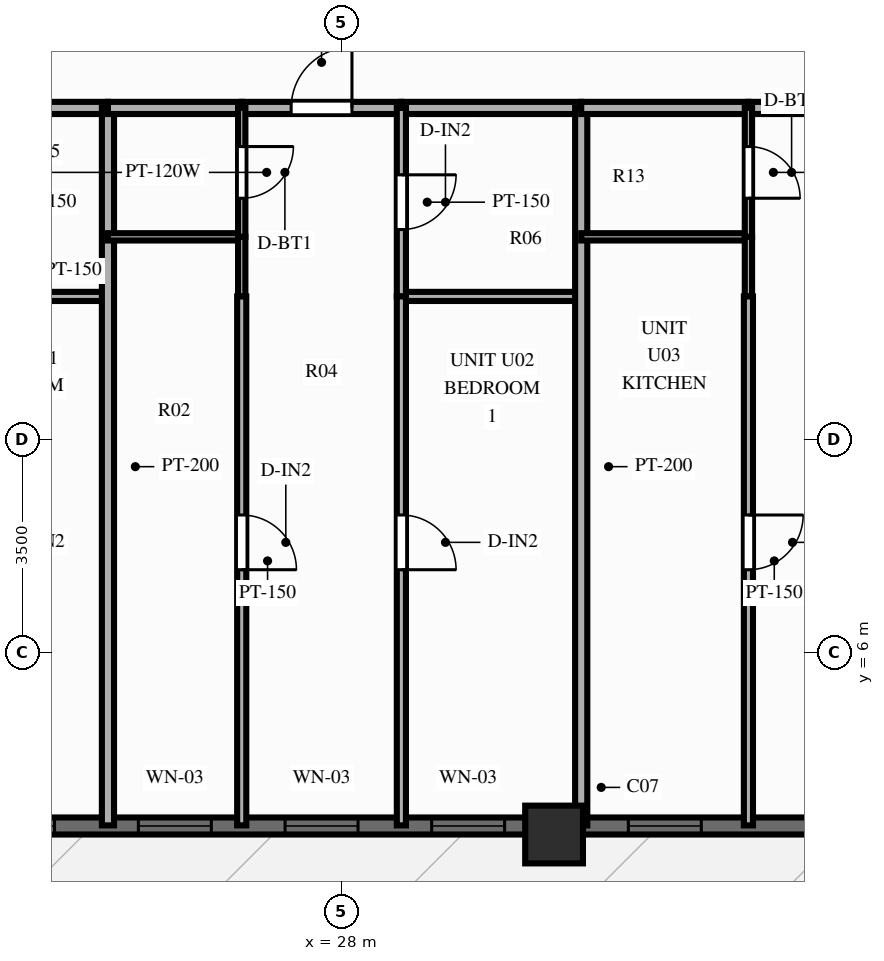
"""IFC4 building model, lengths in metres.
Left out: names, types, materials, properties, quantities, classifications, styles, units other than length and angle.
Written with IfcOpenShell. Run it as: python <this file> out.ifc"""

import sys

from ifc_helpers import new_model, si_unit, direction, frame, frame_2d, origin, origin_2d, place, context, subcontext, project, spatial, rectangle, extrude, source, transform, mapped, element, fill, save


model = new_model("IFC4")
c1 = context("Model", 3, precision=1e-05, world=origin(), true_north=direction((0.0, 1.0)))
c2 = subcontext(c1, "Body", "Model", "MODEL_VIEW")
j1 = project(units=[si_unit("LENGTHUNIT", "METRE"), si_unit("PLANEANGLEUNIT", "RADIAN")], contexts=[c1])
p1 = place(None, origin())
s1 = spatial("IfcSite", under=j1, at=p1, CompositionType="ELEMENT")
p2 = place(p1, origin())
s2 = spatial("IfcBuilding", under=s1, at=p2, CompositionType="ELEMENT")
p3 = place(p2, frame((0.0, 0.0, 80.85)))
s3 = spatial("IfcBuildingStorey", under=s2, at=p3, CompositionType="ELEMENT", Elevation=80.85)
m1 = source(origin(), c2, "Body", "SweptSolid", [
    extrude(rectangle(XDim=0.95, YDim=0.95, at=origin_2d()), origin(), (0.0, 0.0, 1.0), 3.0),
])
p4 = place(p3, frame((31.5, 3.0, 0.0), z_axis=(0.0, 0.0, 1.0), x_axis=(1.0, 0.0, 0.0)))
e1 = element("IfcColumn", 1, at=p4, inside=s3, PredefinedType="COLUMN", context=c2, shape_type="MappedRepresentation", body=[
    mapped(m1, transform((0.0, 0.0, 0.0), scale=1.0)),
])
p5 = place(p3, frame((16.2, 3.14, 0.0), z_axis=(0.0, 0.0, 1.0), x_axis=(1.0, 0.0, 0.0)))
e2 = element("IfcWall", 2, at=p5, inside=s3, PredefinedType="SOLIDWALL", context=c2, shape_type="SweptSolid", body=[
    extrude(rectangle(XDim=43.6, YDim=0.28, at=frame_2d((21.8, 0.0))), origin(), (0.0, 0.0, 1.0), 2.28),
])
p6 = place(p5, frame((0.748, 0.0, 0.25)))
e3 = element("IfcOpeningElement", 3, at=p6, cuts=e2, PredefinedType="OPENING", context=c2, shape_type="SweptSolid", body=[
    extrude(rectangle(XDim=1.2, YDim=1.5, at=frame_2d((0.6, 0.75))), frame((0.0, 0.152, 0.0), z_axis=(0.0, -1.0, 0.0), x_axis=(1.0, 0.0, 0.0)), (0.0, 0.0, 1.0), 0.304),
])
p7 = place(p5, frame((3.093, 0.0, 0.25)))
e4 = element("IfcOpeningElement", 4, at=p7, cuts=e2, PredefinedType="OPENING", context=c2, shape_type="SweptSolid", body=[
    extrude(rectangle(XDim=1.2, YDim=1.5, at=frame_2d((0.6, 0.75))), frame((0.0, 0.152, 0.0), z_axis=(0.0, -1.0, 0.0), x_axis=(1.0, 0.0, 0.0)), (0.0, 0.0, 1.0), 0.304),
])
p8 = place(p5, frame((5.885, 0.0, 0.25)))
e5 = element("IfcOpeningElement", 5, at=p8, cuts=e2, PredefinedType="OPENING", context=c2, shape_type="SweptSolid", body=[
    extrude(rectangle(XDim=1.2, YDim=1.5, at=frame_2d((0.6, 0.75))), frame((0.0, 0.152, 0.0), z_axis=(0.0, -1.0, 0.0), x_axis=(1.0, 0.0, 0.0)), (0.0, 0.0, 1.0), 0.304),
])
p9 = place(p5, frame((8.463, 0.0, 0.25)))
e6 = element("IfcOpeningElement", 6, at=p9, cuts=e2, PredefinedType="OPENING", context=c2, shape_type="SweptSolid", body=[
    extrude(rectangle(XDim=1.2, YDim=1.5, at=frame_2d((0.6, 0.75))), frame((0.0, 0.152, 0.0), z_axis=(0.0, -1.0, 0.0), x_axis=(1.0, 0.0, 0.0)), (0.0, 0.0, 1.0), 0.304),
])
p10 = place(p5, frame((10.876, 0.0, 0.25)))
e7 = element("IfcOpeningElement", 7, at=p10, cuts=e2, PredefinedType="OPENING", context=c2, shape_type="SweptSolid", body=[
    extrude(rectangle(XDim=1.2, YDim=1.5, at=frame_2d((0.6, 0.75))), frame((0.0, 0.152, 0.0), z_axis=(0.0, -1.0, 0.0), x_axis=(1.0, 0.0, 0.0)), (0.0, 0.0, 1.0), 0.304),
])
p11 = place(p5, frame((13.287, 0.0, 0.25)))
e8 = element("IfcOpeningElement", 8, at=p11, cuts=e2, PredefinedType="OPENING", context=c2, shape_type="SweptSolid", body=[
    extrude(rectangle(XDim=1.2, YDim=1.5, at=frame_2d((0.6, 0.75))), frame((0.0, 0.152, 0.0), z_axis=(0.0, -1.0, 0.0), x_axis=(1.0, 0.0, 0.0)), (0.0, 0.0, 1.0), 0.304),
])
p12 = place(p5, frame((16.521, 0.0, 0.25)))
e9 = element("IfcOpeningElement", 9, at=p12, cuts=e2, PredefinedType="OPENING", context=c2, shape_type="SweptSolid", body=[
    extrude(rectangle(XDim=1.2, YDim=1.5, at=frame_2d((0.6, 0.75))), frame((0.0, 0.152, 0.0), z_axis=(0.0, -1.0, 0.0), x_axis=(1.0, 0.0, 0.0)), (0.0, 0.0, 1.0), 0.304),
])
p13 = place(p5, frame((22.938, 0.0, 0.0), z_axis=(0.0, 0.0, 1.0), x_axis=(-1.0, 0.0, 0.0)))
e10 = element("IfcOpeningElement", 10, at=p13, cuts=e2, PredefinedType="OPENING", context=c2, shape_type="SweptSolid", body=[
    extrude(rectangle(XDim=1.1, YDim=2.15, at=frame_2d((0.55, 1.075))), frame((0.0, 0.152, 0.0), z_axis=(0.0, -1.0, 0.0), x_axis=(1.0, 0.0, 0.0)), (0.0, 0.0, 1.0), 0.304),
])
p14 = place(p5, frame((26.657, 0.0, 0.25)))
e11 = element("IfcOpeningElement", 11, at=p14, cuts=e2, PredefinedType="OPENING", context=c2, shape_type="SweptSolid", body=[
    extrude(rectangle(XDim=0.95, YDim=1.5, at=frame_2d((0.475, 0.75))), frame((0.0, 0.152, 0.0), z_axis=(0.0, -1.0, 0.0), x_axis=(1.0, 0.0, 0.0)), (0.0, 0.0, 1.0), 0.304),
])
p15 = place(p5, frame((28.965, 0.0, 0.25)))
e12 = element("IfcOpeningElement", 12, at=p15, cuts=e2, PredefinedType="OPENING", context=c2, shape_type="SweptSolid", body=[
    extrude(rectangle(XDim=0.7, YDim=1.5, at=frame_2d((0.35, 0.75))), frame((0.0, 0.152, 0.0), z_axis=(0.0, -1.0, 0.0), x_axis=(1.0, 0.0, 0.0)), (0.0, 0.0, 1.0), 0.304),
])
p16 = place(p5, frame((31.158, 0.0, 0.25)))
e13 = element("IfcOpeningElement", 13, at=p16, cuts=e2, PredefinedType="OPENING", context=c2, shape_type="SweptSolid", body=[
    extrude(rectangle(XDim=1.2, YDim=1.5, at=frame_2d((0.6, 0.75))), frame((0.0, 0.152, 0.0), z_axis=(0.0, -1.0, 0.0), x_axis=(1.0, 0.0, 0.0)), (0.0, 0.0, 1.0), 0.304),
])
p17 = place(p5, frame((35.992, 0.0, 0.25)))
e14 = element("IfcOpeningElement", 14, at=p17, cuts=e2, PredefinedType="OPENING", context=c2, shape_type="SweptSolid", body=[
    extrude(rectangle(XDim=1.2, YDim=1.5, at=frame_2d((0.6, 0.75))), frame((0.0, 0.152, 0.0), z_axis=(0.0, -1.0, 0.0), x_axis=(1.0, 0.0, 0.0)), (0.0, 0.0, 1.0), 0.304),
])
p18 = place(p5, frame((40.885, 0.0, 0.25)))
e15 = element("IfcOpeningElement", 15, at=p18, cuts=e2, PredefinedType="OPENING", context=c2, shape_type="SweptSolid", body=[
    extrude(rectangle(XDim=1.2, YDim=1.5, at=frame_2d((0.6, 0.75))), frame((0.0, 0.152, 0.0), z_axis=(0.0, -1.0, 0.0), x_axis=(1.0, 0.0, 0.0)), (0.0, 0.0, 1.0), 0.304),
])
p19 = place(p3, frame((21.206, 14.95, 0.0), z_axis=(0.0, 0.0, 1.0), x_axis=(1.0, 0.0, 0.0)))
e16 = element("IfcWall", 16, at=p19, inside=s3, PredefinedType="PARTITIONING", context=c2, shape_type="SweptSolid", body=[
    extrude(rectangle(XDim=2.958, YDim=0.2, at=frame_2d((1.479, 0.0))), origin(), (0.0, 0.0, 1.0), 2.79),
])
p20 = place(p3, frame((21.206, 11.85, 0.0), z_axis=(0.0, 0.0, 1.0), x_axis=(1.0, 0.0, 0.0)))
e17 = element("IfcWall", 17, at=p20, inside=s3, PredefinedType="PARTITIONING", context=c2, shape_type="SweptSolid", body=[
    extrude(rectangle(XDim=2.958, YDim=0.15, at=frame_2d((1.479, 0.0))), origin(), (0.0, 0.0, 1.0), 2.79),
])
p21 = place(p3, frame((24.163, 14.95, 0.0), z_axis=(0.0, 0.0, 1.0), x_axis=(0.0, -1.0, 0.0)))
e18 = element("IfcWall", 18, at=p21, inside=s3, PredefinedType="PARTITIONING", context=c2, shape_type="SweptSolid", body=[
    extrude(rectangle(XDim=11.8, YDim=0.2, at=frame_2d((5.9, 0.0))), origin(), (0.0, 0.0, 1.0), 2.79),
])
p22 = place(p3, frame((24.163, 14.95, 0.0), z_axis=(0.0, 0.0, 1.0), x_axis=(1.0, 0.0, 0.0)))
e19 = element("IfcWall", 19, at=p22, inside=s3, PredefinedType="PARTITIONING", context=c2, shape_type="SweptSolid", body=[
    extrude(rectangle(XDim=2.2, YDim=0.2, at=frame_2d((1.1, 0.0))), origin(), (0.0, 0.0, 1.0), 2.79),
])
p23 = place(p3, frame((26.363, 14.95, 0.0), z_axis=(0.0, 0.0, 1.0), x_axis=(1.0, 0.0, 0.0)))
e20 = element("IfcWall", 20, at=p23, inside=s3, PredefinedType="PARTITIONING", context=c2, shape_type="SweptSolid", body=[
    extrude(rectangle(XDim=2.625, YDim=0.2, at=frame_2d((1.313, 0.0))), origin(), (0.0, 0.0, 1.0), 2.79),
])
p24 = place(p23, frame((0.813, 0.0, 0.0)))
e21 = element("IfcOpeningElement", 21, at=p24, cuts=e20, PredefinedType="OPENING", context=c2, shape_type="SweptSolid", body=[
    extrude(rectangle(XDim=1.0, YDim=2.15, at=frame_2d((0.5, 1.075))), frame((0.0, 0.112, 0.0), z_axis=(0.0, -1.0, 0.0), x_axis=(1.0, 0.0, 0.0)), (0.0, 0.0, 1.0), 0.224),
])
p25 = place(p3, frame((28.989, 14.95, 0.0), z_axis=(0.0, 0.0, 1.0), x_axis=(1.0, 0.0, 0.0)))
e22 = element("IfcWall", 22, at=p25, inside=s3, PredefinedType="PARTITIONING", context=c2, shape_type="SweptSolid", body=[
    extrude(rectangle(XDim=2.958, YDim=0.2, at=frame_2d((1.479, 0.0))), origin(), (0.0, 0.0, 1.0), 2.79),
])
p26 = place(p3, frame((24.163, 12.83, 0.0), z_axis=(0.0, 0.0, 1.0), x_axis=(1.0, 0.0, 0.0)))
e23 = element("IfcWall", 23, at=p26, inside=s3, PredefinedType="PARTITIONING", context=c2, shape_type="SweptSolid", body=[
    extrude(rectangle(XDim=2.2, YDim=0.12, at=frame_2d((1.1, 0.0))), origin(), (0.0, 0.0, 1.0), 2.79),
])
p27 = place(p3, frame((28.989, 11.85, 0.0), z_axis=(0.0, 0.0, 1.0), x_axis=(1.0, 0.0, 0.0)))
e24 = element("IfcWall", 24, at=p27, inside=s3, PredefinedType="PARTITIONING", context=c2, shape_type="SweptSolid", body=[
    extrude(rectangle(XDim=2.958, YDim=0.15, at=frame_2d((1.479, 0.0))), origin(), (0.0, 0.0, 1.0), 2.79),
])
p28 = place(p3, frame((26.363, 14.95, 0.0), z_axis=(0.0, 0.0, 1.0), x_axis=(0.0, -1.0, 0.0)))
e25 = element("IfcWall", 25, at=p28, inside=s3, PredefinedType="PARTITIONING", context=c2, shape_type="SweptSolid", body=[
    extrude(rectangle(XDim=2.12, YDim=0.12, at=frame_2d((1.06, 0.0))), origin(), (0.0, 0.0, 1.0), 2.79),
])
p29 = place(p28, frame((0.635, 0.0, 0.0)))
e26 = element("IfcOpeningElement", 26, at=p29, cuts=e25, PredefinedType="OPENING", context=c2, shape_type="SweptSolid", body=[
    extrude(rectangle(XDim=0.85, YDim=2.05, at=frame_2d((0.425, 1.025))), frame((0.0, 0.072, 0.0), z_axis=(0.0, -1.0, 0.0), x_axis=(1.0, 0.0, 0.0)), (0.0, 0.0, 1.0), 0.144),
])
p30 = place(p3, frame((26.363, 12.83, 0.0), z_axis=(0.0, 0.0, 1.0), x_axis=(0.0, -1.0, 0.0)))
e27 = element("IfcWall", 27, at=p30, inside=s3, PredefinedType="PARTITIONING", context=c2, shape_type="SweptSolid", body=[
    extrude(rectangle(XDim=0.98, YDim=0.12, at=frame_2d((0.49, 0.0))), origin(), (0.0, 0.0, 1.0), 2.79),
])
p31 = place(p3, frame((26.363, 11.85, 0.0), z_axis=(0.0, 0.0, 1.0), x_axis=(0.0, -1.0, 0.0)))
e28 = element("IfcWall", 28, at=p31, inside=s3, PredefinedType="PARTITIONING", context=c2, shape_type="SweptSolid", body=[
    extrude(rectangle(XDim=8.7, YDim=0.15, at=frame_2d((4.35, 0.0))), origin(), (0.0, 0.0, 1.0), 2.79),
])
p32 = place(p31, frame((3.595, 0.0, 0.0)))
e29 = element("IfcOpeningElement", 29, at=p32, cuts=e28, PredefinedType="OPENING", context=c2, shape_type="SweptSolid", body=[
    extrude(rectangle(XDim=0.9, YDim=2.1, at=frame_2d((0.45, 1.05))), frame((0.0, 0.087, 0.0), z_axis=(0.0, -1.0, 0.0), x_axis=(1.0, 0.0, 0.0)), (0.0, 0.0, 1.0), 0.174),
])
p33 = place(p3, frame((28.989, 14.95, 0.0), z_axis=(0.0, 0.0, 1.0), x_axis=(0.0, -1.0, 0.0)))
e30 = element("IfcWall", 30, at=p33, inside=s3, PredefinedType="PARTITIONING", context=c2, shape_type="SweptSolid", body=[
    extrude(rectangle(XDim=3.1, YDim=0.15, at=frame_2d((1.55, 0.0))), origin(), (0.0, 0.0, 1.0), 2.79),
])
p34 = place(p33, frame((1.1, 0.0, 0.0)))
e31 = element("IfcOpeningElement", 31, at=p34, cuts=e30, PredefinedType="OPENING", context=c2, shape_type="SweptSolid", body=[
    extrude(rectangle(XDim=0.9, YDim=2.1, at=frame_2d((0.45, 1.05))), frame((0.0, 0.087, 0.0), z_axis=(0.0, -1.0, 0.0), x_axis=(1.0, 0.0, 0.0)), (0.0, 0.0, 1.0), 0.174),
])
p35 = place(p3, frame((28.989, 11.85, 0.0), z_axis=(0.0, 0.0, 1.0), x_axis=(0.0, -1.0, 0.0)))
e32 = element("IfcWall", 32, at=p35, inside=s3, PredefinedType="PARTITIONING", context=c2, shape_type="SweptSolid", body=[
    extrude(rectangle(XDim=8.7, YDim=0.15, at=frame_2d((4.35, 0.0))), origin(), (0.0, 0.0, 1.0), 2.79),
])
p36 = place(p35, frame((3.595, 0.0, 0.0)))
e33 = element("IfcOpeningElement", 33, at=p36, cuts=e32, PredefinedType="OPENING", context=c2, shape_type="SweptSolid", body=[
    extrude(rectangle(XDim=0.9, YDim=2.1, at=frame_2d((0.45, 1.05))), frame((0.0, 0.087, 0.0), z_axis=(0.0, -1.0, 0.0), x_axis=(1.0, 0.0, 0.0)), (0.0, 0.0, 1.0), 0.174),
])
p37 = place(p3, frame((31.946, 14.95, 0.0), z_axis=(0.0, 0.0, 1.0), x_axis=(0.0, -1.0, 0.0)))
e34 = element("IfcWall", 34, at=p37, inside=s3, PredefinedType="PARTITIONING", context=c2, shape_type="SweptSolid", body=[
    extrude(rectangle(XDim=11.8, YDim=0.2, at=frame_2d((5.9, 0.0))), origin(), (0.0, 0.0, 1.0), 2.79),
])
p38 = place(p3, frame((31.946, 14.95, 0.0), z_axis=(0.0, 0.0, 1.0), x_axis=(1.0, 0.0, 0.0)))
e35 = element("IfcWall", 35, at=p38, inside=s3, PredefinedType="PARTITIONING", context=c2, shape_type="SweptSolid", body=[
    extrude(rectangle(XDim=2.75, YDim=0.2, at=frame_2d((1.375, 0.0))), origin(), (0.0, 0.0, 1.0), 2.79),
])
p39 = place(p3, frame((34.696, 14.95, 0.0), z_axis=(0.0, 0.0, 1.0), x_axis=(1.0, 0.0, 0.0)))
e36 = element("IfcWall", 36, at=p39, inside=s3, PredefinedType="PARTITIONING", context=c2, shape_type="SweptSolid", body=[
    extrude(rectangle(XDim=7.784, YDim=0.2, at=frame_2d((3.892, 0.0))), origin(), (0.0, 0.0, 1.0), 2.79),
])
p40 = place(p39, frame((3.392, 0.0, 0.0)))
e37 = element("IfcOpeningElement", 37, at=p40, cuts=e36, PredefinedType="OPENING", context=c2, shape_type="SweptSolid", body=[
    extrude(rectangle(XDim=1.0, YDim=2.15, at=frame_2d((0.5, 1.075))), frame((0.0, 0.112, 0.0), z_axis=(0.0, -1.0, 0.0), x_axis=(1.0, 0.0, 0.0)), (0.0, 0.0, 1.0), 0.224),
])
p41 = place(p3, frame((31.946, 12.83, 0.0), z_axis=(0.0, 0.0, 1.0), x_axis=(1.0, 0.0, 0.0)))
e38 = element("IfcWall", 38, at=p41, inside=s3, PredefinedType="PARTITIONING", context=c2, shape_type="SweptSolid", body=[
    extrude(rectangle(XDim=2.75, YDim=0.12, at=frame_2d((1.375, 0.0))), origin(), (0.0, 0.0, 1.0), 2.79),
])
p42 = place(p3, frame((34.696, 14.95, 0.0), z_axis=(0.0, 0.0, 1.0), x_axis=(0.0, -1.0, 0.0)))
e39 = element("IfcWall", 39, at=p42, inside=s3, PredefinedType="PARTITIONING", context=c2, shape_type="SweptSolid", body=[
    extrude(rectangle(XDim=2.12, YDim=0.12, at=frame_2d((1.06, 0.0))), origin(), (0.0, 0.0, 1.0), 2.79),
])
p43 = place(p42, frame((0.635, 0.0, 0.0)))
e40 = element("IfcOpeningElement", 40, at=p43, cuts=e39, PredefinedType="OPENING", context=c2, shape_type="SweptSolid", body=[
    extrude(rectangle(XDim=0.85, YDim=2.05, at=frame_2d((0.425, 1.025))), frame((0.0, 0.072, 0.0), z_axis=(0.0, -1.0, 0.0), x_axis=(1.0, 0.0, 0.0)), (0.0, 0.0, 1.0), 0.144),
])
p44 = place(p3, frame((34.696, 12.83, 0.0), z_axis=(0.0, 0.0, 1.0), x_axis=(0.0, -1.0, 0.0)))
e41 = element("IfcWall", 41, at=p44, inside=s3, PredefinedType="PARTITIONING", context=c2, shape_type="SweptSolid", body=[
    extrude(rectangle(XDim=0.98, YDim=0.12, at=frame_2d((0.49, 0.0))), origin(), (0.0, 0.0, 1.0), 2.79),
])
p45 = place(p3, frame((34.696, 11.85, 0.0), z_axis=(0.0, 0.0, 1.0), x_axis=(0.0, -1.0, 0.0)))
e42 = element("IfcWall", 42, at=p45, inside=s3, PredefinedType="PARTITIONING", context=c2, shape_type="SweptSolid", body=[
    extrude(rectangle(XDim=8.7, YDim=0.15, at=frame_2d((4.35, 0.0))), origin(), (0.0, 0.0, 1.0), 2.79),
])
p46 = place(p45, frame((3.595, 0.0, 0.0)))
e43 = element("IfcOpeningElement", 43, at=p46, cuts=e42, PredefinedType="OPENING", context=c2, shape_type="SweptSolid", body=[
    extrude(rectangle(XDim=0.9, YDim=2.1, at=frame_2d((0.45, 1.05))), frame((0.0, 0.087, 0.0), z_axis=(0.0, -1.0, 0.0), x_axis=(1.0, 0.0, 0.0)), (0.0, 0.0, 1.0), 0.174),
])
m2 = source(origin(), c2, "Body", "SweptSolid", [
    extrude(rectangle(XDim=1.2, YDim=1.5, at=frame_2d((0.6, 0.75))), frame((0.0, 0.03, 0.0), z_axis=(0.0, -1.0, 0.0), x_axis=(1.0, 0.0, 0.0)), (0.0, 0.0, 1.0), 0.06),
])
p47 = place(p8, origin())
e44 = element("IfcWindow", 44, at=p47, inside=s3, PartitioningType="SINGLE_PANEL", PredefinedType="WINDOW", context=c2, shape_type="MappedRepresentation", body=[
    mapped(m2, transform((0.0, 0.0, 0.0), scale=1.0)),
])
fill(e5, e44)
p48 = place(p9, origin())
e45 = element("IfcWindow", 45, at=p48, inside=s3, PartitioningType="SINGLE_PANEL", PredefinedType="WINDOW", context=c2, shape_type="MappedRepresentation", body=[
    mapped(m2, transform((0.0, 0.0, 0.0), scale=1.0)),
])
fill(e6, e45)
p49 = place(p10, origin())
e46 = element("IfcWindow", 46, at=p49, inside=s3, PartitioningType="SINGLE_PANEL", PredefinedType="WINDOW", context=c2, shape_type="MappedRepresentation", body=[
    mapped(m2, transform((0.0, 0.0, 0.0), scale=1.0)),
])
fill(e7, e46)
p50 = place(p11, origin())
e47 = element("IfcWindow", 47, at=p50, inside=s3, PartitioningType="SINGLE_PANEL", PredefinedType="WINDOW", context=c2, shape_type="MappedRepresentation", body=[
    mapped(m2, transform((0.0, 0.0, 0.0), scale=1.0)),
])
fill(e8, e47)
p51 = place(p12, origin())
e48 = element("IfcWindow", 48, at=p51, inside=s3, PartitioningType="SINGLE_PANEL", PredefinedType="WINDOW", context=c2, shape_type="MappedRepresentation", body=[
    mapped(m2, transform((0.0, 0.0, 0.0), scale=1.0)),
])
fill(e9, e48)
m3 = source(origin(), c2, "Body", "SweptSolid", [
    extrude(rectangle(XDim=1.0, YDim=2.15, at=frame_2d((0.5, 1.075))), frame((0.0, 0.025, 0.0), z_axis=(0.0, -1.0, 0.0), x_axis=(1.0, 0.0, 0.0)), (0.0, 0.0, 1.0), 0.05),
])
p52 = place(p24, origin())
e49 = element("IfcDoor", 49, at=p52, inside=s3, OperationType="SINGLE_SWING_RIGHT", PredefinedType="DOOR", context=c2, shape_type="MappedRepresentation", body=[
    mapped(m3, transform((0.0, 0.0, 0.0), scale=1.0)),
])
fill(e21, e49)
m4 = source(origin(), c2, "Body", "SweptSolid", [
    extrude(rectangle(XDim=0.85, YDim=2.05, at=frame_2d((0.425, 1.025))), frame((0.0, 0.025, 0.0), z_axis=(0.0, -1.0, 0.0), x_axis=(1.0, 0.0, 0.0)), (0.0, 0.0, 1.0), 0.05),
])
p53 = place(p29, origin())
e50 = element("IfcDoor", 50, at=p53, inside=s3, OperationType="SINGLE_SWING_LEFT", PredefinedType="DOOR", context=c2, shape_type="MappedRepresentation", body=[
    mapped(m4, transform((0.0, 0.0, 0.0), scale=1.0)),
])
fill(e26, e50)
m5 = source(origin(), c2, "Body", "SweptSolid", [
    extrude(rectangle(XDim=0.9, YDim=2.1, at=frame_2d((0.45, 1.05))), frame((0.0, 0.025, 0.0), z_axis=(0.0, -1.0, 0.0), x_axis=(1.0, 0.0, 0.0)), (0.0, 0.0, 1.0), 0.05),
])
p54 = place(p32, origin())
e51 = element("IfcDoor", 51, at=p54, inside=s3, OperationType="SINGLE_SWING_RIGHT", PredefinedType="DOOR", context=c2, shape_type="MappedRepresentation", body=[
    mapped(m5, transform((0.0, 0.0, 0.0), scale=1.0)),
])
fill(e29, e51)
p55 = place(p34, origin())
e52 = element("IfcDoor", 52, at=p55, inside=s3, OperationType="SINGLE_SWING_LEFT", PredefinedType="DOOR", context=c2, shape_type="MappedRepresentation", body=[
    mapped(m5, transform((0.0, 0.0, 0.0), scale=1.0)),
])
fill(e31, e52)
p56 = place(p36, origin())
e53 = element("IfcDoor", 53, at=p56, inside=s3, OperationType="SINGLE_SWING_RIGHT", PredefinedType="DOOR", context=c2, shape_type="MappedRepresentation", body=[
    mapped(m5, transform((0.0, 0.0, 0.0), scale=1.0)),
])
fill(e33, e53)
p57 = place(p43, origin())
e54 = element("IfcDoor", 54, at=p57, inside=s3, OperationType="SINGLE_SWING_RIGHT", PredefinedType="DOOR", context=c2, shape_type="MappedRepresentation", body=[
    mapped(m4, transform((0.0, 0.0, 0.0), scale=1.0)),
])
fill(e40, e54)
p58 = place(p46, origin())
e55 = element("IfcDoor", 55, at=p58, inside=s3, OperationType="SINGLE_SWING_LEFT", PredefinedType="DOOR", context=c2, shape_type="MappedRepresentation", body=[
    mapped(m5, transform((0.0, 0.0, 0.0), scale=1.0)),
])
fill(e43, e55)
save(model, sys.argv[1])
